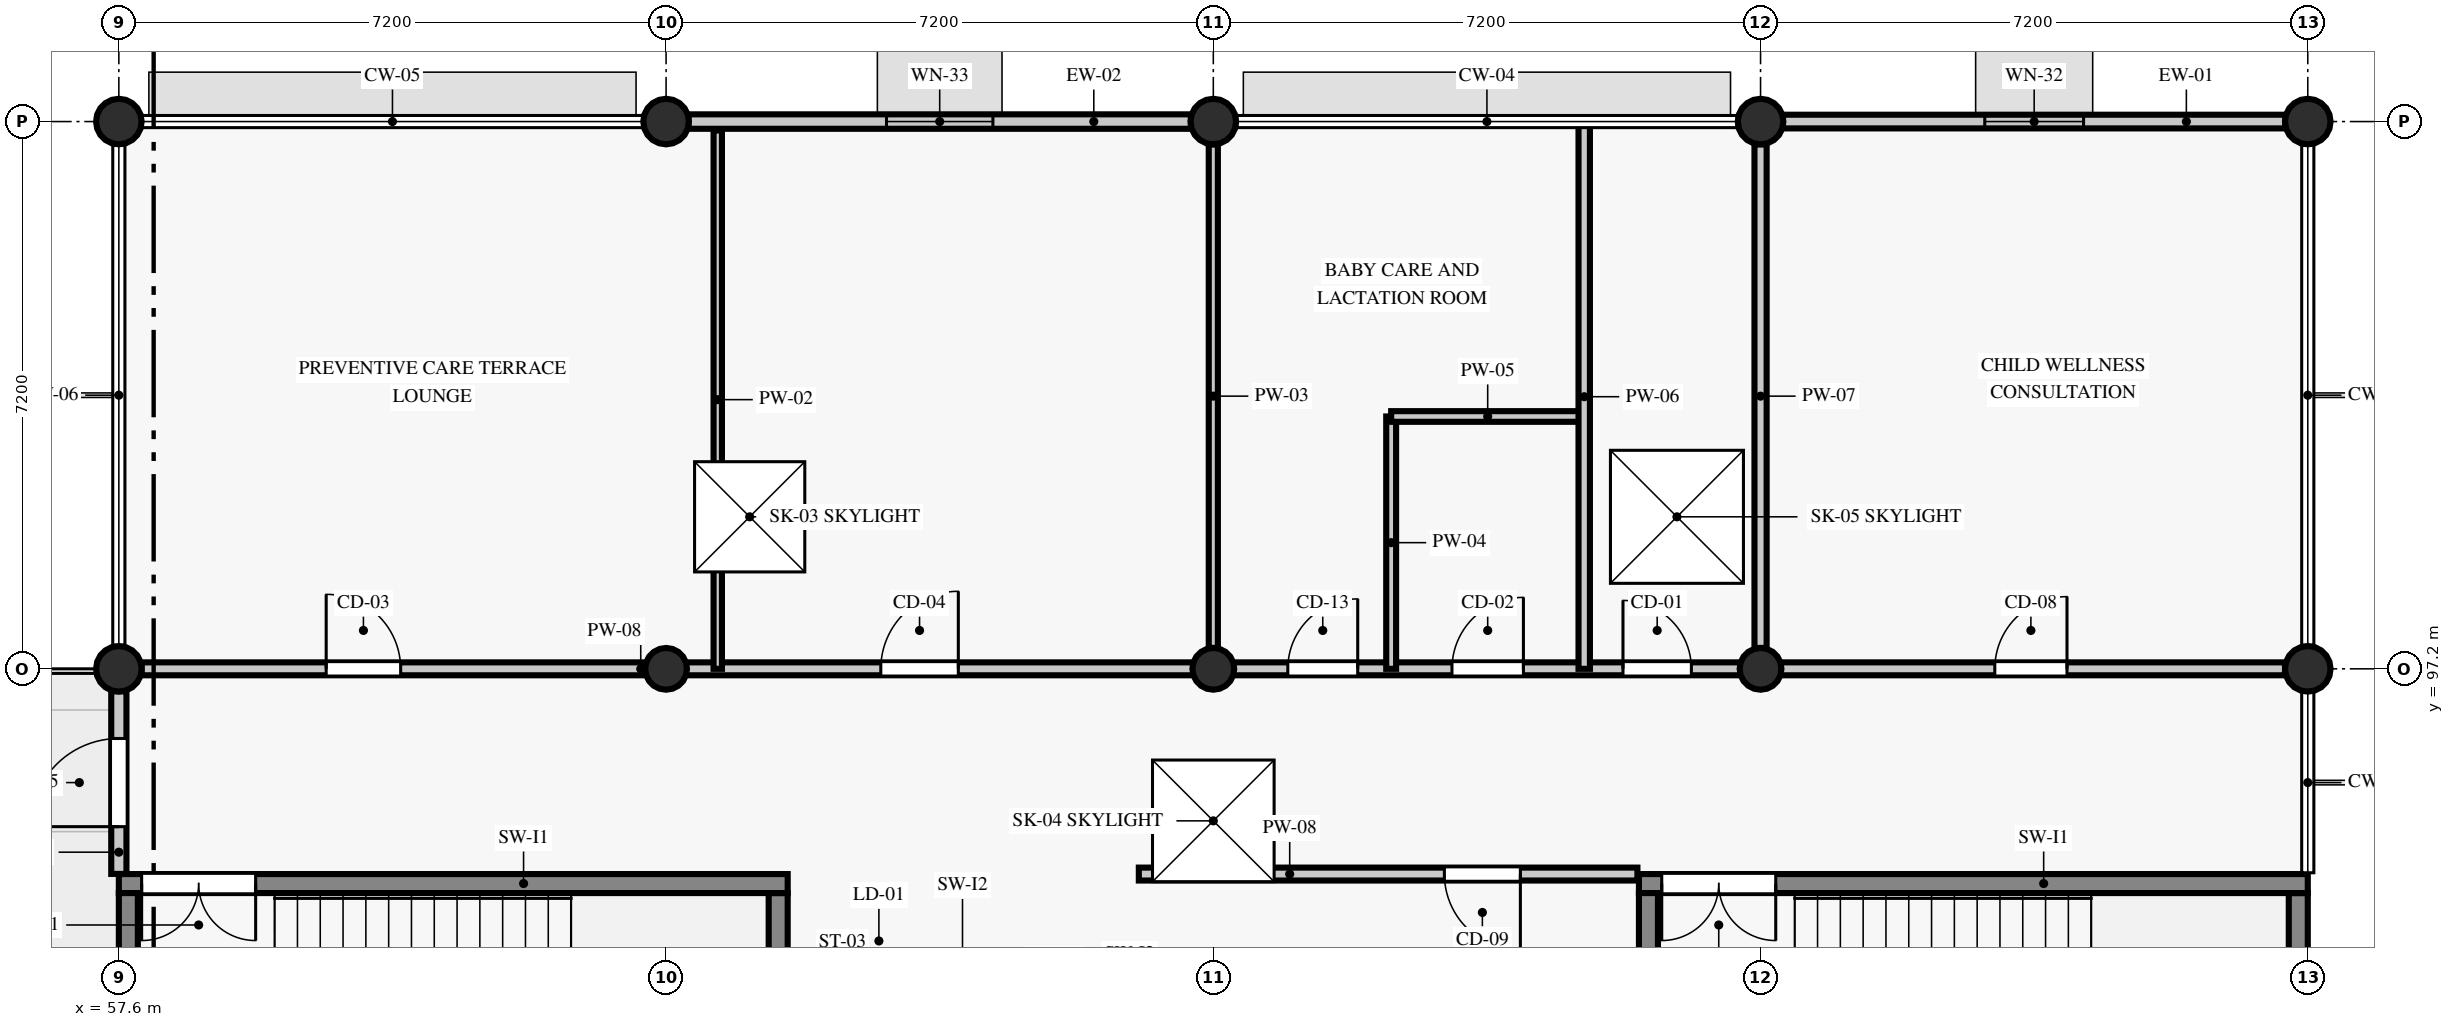
"""IFC4 building model, lengths in metres.
Left out: names, types, materials, properties, quantities, classifications, styles, units other than length and angle.
Written with IfcOpenShell. Run it as: python <this file> out.ifc"""

import sys

from ifc_helpers import new_model, si_unit, direction, frame, frame_2d, origin, origin_2d, place, context, subcontext, project, spatial, rectangle, circle, extrude, element, fill, save


model = new_model("IFC4")
c1 = context("Model", 3, precision=1e-05, world=origin(), true_north=direction((0.0, 1.0)))
c2 = subcontext(c1, "Body", "Model", "MODEL_VIEW")
j1 = project(units=[si_unit("LENGTHUNIT", "METRE"), si_unit("PLANEANGLEUNIT", "RADIAN")], contexts=[c1])
p1 = place(None, origin())
s1 = spatial("IfcSite", under=j1, at=p1, CompositionType="ELEMENT")
p2 = place(p1, origin())
s2 = spatial("IfcBuilding", under=s1, at=p2, CompositionType="ELEMENT")
p3 = place(p2, frame((0.0, 0.0, 22.2)))
s3 = spatial("IfcBuildingStorey", under=s2, at=p3, CompositionType="ELEMENT", Elevation=22.2)
for number, where, z_axis, x_axis in (
    (1, (57.6, 97.2, 0.0), (0.0, 0.0, 1.0), (1.0, 0.0, 0.0)),
    (2, (57.6, 104.4, 0.0), (0.0, 0.0, 1.0), (1.0, 0.0, 0.0)),
):
    element("IfcColumn", number, at=place(p3, frame(where, z_axis=z_axis, x_axis=x_axis)), inside=s3, PredefinedType="COLUMN", context=c2, shape_type="SweptSolid", body=[
        extrude(circle(Radius=0.3, at=origin_2d()), origin(), (0.0, 0.0, 1.0), 3.975),
    ])
p4 = place(p3, frame((64.8, 97.2, 0.0), z_axis=(0.0, 0.0, 1.0), x_axis=(1.0, 0.0, 0.0)))
e3 = element("IfcColumn", 3, at=p4, inside=s3, PredefinedType="COLUMN", context=c2, shape_type="SweptSolid", body=[
    extrude(circle(Radius=0.275, at=origin_2d()), origin(), (0.0, 0.0, 1.0), 3.975),
])
p5 = place(p3, frame((64.8, 104.4, 0.0), z_axis=(0.0, 0.0, 1.0), x_axis=(1.0, 0.0, 0.0)))
e4 = element("IfcColumn", 4, at=p5, inside=s3, PredefinedType="COLUMN", context=c2, shape_type="SweptSolid", body=[
    extrude(circle(Radius=0.3, at=origin_2d()), origin(), (0.0, 0.0, 1.0), 3.975),
])
p6 = place(p3, frame((72.0, 97.2, 0.0), z_axis=(0.0, 0.0, 1.0), x_axis=(1.0, 0.0, 0.0)))
e5 = element("IfcColumn", 5, at=p6, inside=s3, PredefinedType="COLUMN", context=c2, shape_type="SweptSolid", body=[
    extrude(circle(Radius=0.275, at=origin_2d()), origin(), (0.0, 0.0, 1.0), 3.975),
])
p7 = place(p3, frame((72.0, 104.4, 0.0), z_axis=(0.0, 0.0, 1.0), x_axis=(1.0, 0.0, 0.0)))
e6 = element("IfcColumn", 6, at=p7, inside=s3, PredefinedType="COLUMN", context=c2, shape_type="SweptSolid", body=[
    extrude(circle(Radius=0.3, at=origin_2d()), origin(), (0.0, 0.0, 1.0), 3.975),
])
p8 = place(p3, frame((79.2, 97.2, 0.0), z_axis=(0.0, 0.0, 1.0), x_axis=(1.0, 0.0, 0.0)))
e7 = element("IfcColumn", 7, at=p8, inside=s3, PredefinedType="COLUMN", context=c2, shape_type="SweptSolid", body=[
    extrude(circle(Radius=0.275, at=origin_2d()), origin(), (0.0, 0.0, 1.0), 3.975),
])
for number, where, z_axis, x_axis in (
    (8, (79.2, 104.4, 0.0), (0.0, 0.0, 1.0), (1.0, 0.0, 0.0)),
    (9, (86.4, 97.2, 0.0), (0.0, 0.0, 1.0), (1.0, 0.0, 0.0)),
    (10, (86.4, 104.4, 0.0), (0.0, 0.0, 1.0), (1.0, 0.0, 0.0)),
):
    element("IfcColumn", number, at=place(p3, frame(where, z_axis=z_axis, x_axis=x_axis)), inside=s3, PredefinedType="COLUMN", context=c2, shape_type="SweptSolid", body=[
        extrude(circle(Radius=0.3, at=origin_2d()), origin(), (0.0, 0.0, 1.0), 3.975),
    ])
p9 = place(p3, frame((86.105, 104.4, 0.0), z_axis=(0.0, 0.0, 1.0), x_axis=(-1.0, 0.0, 0.0)))
e11 = element("IfcWall", 11, at=p9, inside=s3, PredefinedType="STANDARD", context=c2, shape_type="SweptSolid", body=[
    extrude(rectangle(XDim=6.61, YDim=0.18, at=frame_2d((3.305, 0.0))), origin(), (0.0, 0.0, 1.0), 3.325),
])
p10 = place(p9, frame((2.655, 0.0, 0.9)))
e12 = element("IfcOpeningElement", 12, at=p10, cuts=e11, PredefinedType="OPENING", context=c2, shape_type="SweptSolid", body=[
    extrude(rectangle(XDim=1.3, YDim=1.66, at=frame_2d((0.65, 0.83))), frame((0.0, 0.1, 0.0), z_axis=(0.0, -1.0, 0.0), x_axis=(1.0, 0.0, 0.0)), (0.0, 0.0, 1.0), 0.2),
])
p11 = place(p3, frame((71.705, 104.4, 0.0), z_axis=(0.0, 0.0, 1.0), x_axis=(-1.0, 0.0, 0.0)))
e13 = element("IfcWall", 13, at=p11, inside=s3, PredefinedType="STANDARD", context=c2, shape_type="SweptSolid", body=[
    extrude(rectangle(XDim=6.61, YDim=0.19, at=frame_2d((3.305, 0.0))), origin(), (0.0, 0.0, 1.0), 3.325),
])
p12 = place(p11, frame((2.605, 0.0, 0.9)))
e14 = element("IfcOpeningElement", 14, at=p12, cuts=e13, PredefinedType="OPENING", context=c2, shape_type="SweptSolid", body=[
    extrude(rectangle(XDim=1.4, YDim=1.66, at=frame_2d((0.7, 0.83))), frame((0.0, 0.105, 0.0), z_axis=(0.0, -1.0, 0.0), x_axis=(1.0, 0.0, 0.0)), (0.0, 0.0, 1.0), 0.21),
])
p13 = place(p3, frame((57.6, 96.905, 0.0), z_axis=(0.0, 0.0, 1.0), x_axis=(0.0, -1.0, 0.0)))
e15 = element("IfcWall", 15, at=p13, inside=s3, PredefinedType="STANDARD", context=c2, shape_type="SweptSolid", body=[
    extrude(rectangle(XDim=2.403, YDim=0.2, at=frame_2d((1.202, 0.0))), origin(), (0.0, 0.0, 1.0), 3.975),
])
p14 = place(p13, frame((0.622, 0.0, 0.0)))
e16 = element("IfcOpeningElement", 16, at=p14, cuts=e15, PredefinedType="OPENING", context=c2, shape_type="SweptSolid", body=[
    extrude(rectangle(XDim=1.16, YDim=2.14, at=frame_2d((0.58, 1.07))), frame((0.0, 0.11, 0.0), z_axis=(0.0, -1.0, 0.0), x_axis=(1.0, 0.0, 0.0)), (0.0, 0.0, 1.0), 0.22),
])
p15 = place(p3, frame((66.275, 90.25, 0.0), z_axis=(0.0, 0.0, 1.0), x_axis=(0.0, 1.0, 0.0)))
e17 = element("IfcWall", 17, at=p15, inside=s3, PredefinedType="SHEAR", context=c2, shape_type="SweptSolid", body=[
    extrude(rectangle(XDim=4.0, YDim=0.25, at=frame_2d((2.0, 0.0))), origin(), (0.0, 0.0, 1.0), 3.975),
])
p16 = place(p3, frame((66.4, 94.375, 0.0), z_axis=(0.0, 0.0, 1.0), x_axis=(-1.0, 0.0, 0.0)))
e18 = element("IfcWall", 18, at=p16, inside=s3, PredefinedType="SHEAR", context=c2, shape_type="SweptSolid", body=[
    extrude(rectangle(XDim=8.8, YDim=0.25, at=frame_2d((4.4, 0.0))), origin(), (0.0, 0.0, 1.0), 3.975),
])
p17 = place(p16, frame((7.0, 0.0, 0.0)))
e19 = element("IfcOpeningElement", 19, at=p17, cuts=e18, PredefinedType="OPENING", context=c2, shape_type="SweptSolid", body=[
    extrude(rectangle(XDim=1.5, YDim=2.15, at=frame_2d((0.75, 1.075))), frame((0.0, 0.135, 0.0), z_axis=(0.0, -1.0, 0.0), x_axis=(1.0, 0.0, 0.0)), (0.0, 0.0, 1.0), 0.27),
])
for number, where, z_axis, x_axis in (
    (20, (57.725, 94.25, 0.0), (0.0, 0.0, 1.0), (0.0, -1.0, 0.0)),
    (21, (86.275, 90.25, 0.0), (0.0, 0.0, 1.0), (0.0, 1.0, 0.0)),
):
    element("IfcWall", number, at=place(p3, frame(where, z_axis=z_axis, x_axis=x_axis)), inside=s3, PredefinedType="SHEAR", context=c2, shape_type="SweptSolid", body=[
        extrude(rectangle(XDim=4.0, YDim=0.25, at=frame_2d((2.0, 0.0))), origin(), (0.0, 0.0, 1.0), 3.975),
    ])
p18 = place(p3, frame((86.4, 94.375, 0.0), z_axis=(0.0, 0.0, 1.0), x_axis=(-1.0, 0.0, 0.0)))
e22 = element("IfcWall", 22, at=p18, inside=s3, PredefinedType="SHEAR", context=c2, shape_type="SweptSolid", body=[
    extrude(rectangle(XDim=8.8, YDim=0.25, at=frame_2d((4.4, 0.0))), origin(), (0.0, 0.0, 1.0), 3.975),
])
p19 = place(p18, frame((7.0, 0.0, 0.0)))
e23 = element("IfcOpeningElement", 23, at=p19, cuts=e22, PredefinedType="OPENING", context=c2, shape_type="SweptSolid", body=[
    extrude(rectangle(XDim=1.5, YDim=2.15, at=frame_2d((0.75, 1.075))), frame((0.0, 0.135, 0.0), z_axis=(0.0, -1.0, 0.0), x_axis=(1.0, 0.0, 0.0)), (0.0, 0.0, 1.0), 0.27),
])
p20 = place(p3, frame((77.725, 94.25, 0.0), z_axis=(0.0, 0.0, 1.0), x_axis=(0.0, -1.0, 0.0)))
e24 = element("IfcWall", 24, at=p20, inside=s3, PredefinedType="SHEAR", context=c2, shape_type="SweptSolid", body=[
    extrude(rectangle(XDim=4.0, YDim=0.25, at=frame_2d((2.0, 0.0))), origin(), (0.0, 0.0, 1.0), 3.975),
])
p21 = place(p3, frame((57.9, 97.2, 0.0), z_axis=(0.0, 0.0, 1.0), x_axis=(1.0, 0.0, 0.0)))
e25 = element("IfcWall", 25, at=p21, inside=s3, PredefinedType="PARTITIONING", context=c2, shape_type="SweptSolid", body=[
    extrude(rectangle(XDim=28.2, YDim=0.17, at=frame_2d((14.1, 0.0))), origin(), (0.0, 0.0, 1.0), 3.225),
])
p22 = place(p21, frame((2.428, 0.0, 0.0)))
e26 = element("IfcOpeningElement", 26, at=p22, cuts=e25, PredefinedType="OPENING", context=c2, shape_type="SweptSolid", body=[
    extrude(rectangle(XDim=0.98, YDim=2.08, at=frame_2d((0.49, 1.04))), frame((0.0, 0.095, 0.0), z_axis=(0.0, -1.0, 0.0), x_axis=(1.0, 0.0, 0.0)), (0.0, 0.0, 1.0), 0.19),
])
p23 = place(p21, frame((9.725, 0.0, 0.0)))
e27 = element("IfcOpeningElement", 27, at=p23, cuts=e25, PredefinedType="OPENING", context=c2, shape_type="SweptSolid", body=[
    extrude(rectangle(XDim=1.02, YDim=2.08, at=frame_2d((0.51, 1.04))), frame((0.0, 0.095, 0.0), z_axis=(0.0, -1.0, 0.0), x_axis=(1.0, 0.0, 0.0)), (0.0, 0.0, 1.0), 0.19),
])
p24 = place(p21, frame((15.08, 0.0, 0.0)))
e28 = element("IfcOpeningElement", 28, at=p24, cuts=e25, PredefinedType="OPENING", context=c2, shape_type="SweptSolid", body=[
    extrude(rectangle(XDim=0.92, YDim=2.18, at=frame_2d((0.46, 1.09))), frame((0.0, 0.095, 0.0), z_axis=(0.0, -1.0, 0.0), x_axis=(1.0, 0.0, 0.0)), (0.0, 0.0, 1.0), 0.19),
])
p25 = place(p21, frame((17.24, 0.0, 0.0)))
e29 = element("IfcOpeningElement", 29, at=p25, cuts=e25, PredefinedType="OPENING", context=c2, shape_type="SweptSolid", body=[
    extrude(rectangle(XDim=0.94, YDim=2.08, at=frame_2d((0.47, 1.04))), frame((0.0, 0.095, 0.0), z_axis=(0.0, -1.0, 0.0), x_axis=(1.0, 0.0, 0.0)), (0.0, 0.0, 1.0), 0.19),
])
p26 = place(p21, frame((19.49, 0.0, 0.0)))
e30 = element("IfcOpeningElement", 30, at=p26, cuts=e25, PredefinedType="OPENING", context=c2, shape_type="SweptSolid", body=[
    extrude(rectangle(XDim=0.9, YDim=2.08, at=frame_2d((0.45, 1.04))), frame((0.0, 0.095, 0.0), z_axis=(0.0, -1.0, 0.0), x_axis=(1.0, 0.0, 0.0)), (0.0, 0.0, 1.0), 0.19),
])
p27 = place(p21, frame((24.382, 0.0, 0.0)))
e31 = element("IfcOpeningElement", 31, at=p27, cuts=e25, PredefinedType="OPENING", context=c2, shape_type="SweptSolid", body=[
    extrude(rectangle(XDim=0.95, YDim=2.13, at=frame_2d((0.475, 1.065))), frame((0.0, 0.095, 0.0), z_axis=(0.0, -1.0, 0.0), x_axis=(1.0, 0.0, 0.0)), (0.0, 0.0, 1.0), 0.19),
])
p28 = place(p3, frame((65.48, 97.2, 0.0), z_axis=(0.0, 0.0, 1.0), x_axis=(0.0, 1.0, 0.0)))
e32 = element("IfcWall", 32, at=p28, inside=s3, PredefinedType="PARTITIONING", context=c2, shape_type="SweptSolid", body=[
    extrude(rectangle(XDim=7.083, YDim=0.11, at=frame_2d((3.542, 0.0))), origin(), (0.0, 0.0, 1.0), 3.225),
])
p29 = place(p3, frame((72.0, 97.475, 0.0), z_axis=(0.0, 0.0, 1.0), x_axis=(0.0, 1.0, 0.0)))
e33 = element("IfcWall", 33, at=p29, inside=s3, PredefinedType="PARTITIONING", context=c2, shape_type="SweptSolid", body=[
    extrude(rectangle(XDim=6.625, YDim=0.12, at=frame_2d((3.312, 0.0))), origin(), (0.0, 0.0, 1.0), 3.425),
])
p30 = place(p3, frame((74.34, 97.2, 0.0), z_axis=(0.0, 0.0, 1.0), x_axis=(0.0, 1.0, 0.0)))
e34 = element("IfcWall", 34, at=p30, inside=s3, PredefinedType="PARTITIONING", context=c2, shape_type="SweptSolid", body=[
    extrude(rectangle(XDim=3.32, YDim=0.13, at=frame_2d((1.66, 0.0))), origin(), (0.0, 0.0, 1.0), 3.225),
])
p31 = place(p3, frame((74.34, 100.52, 0.0), z_axis=(0.0, 0.0, 1.0), x_axis=(1.0, 0.0, 0.0)))
e35 = element("IfcWall", 35, at=p31, inside=s3, PredefinedType="PARTITIONING", context=c2, shape_type="SweptSolid", body=[
    extrude(rectangle(XDim=2.54, YDim=0.14, at=frame_2d((1.27, 0.0))), origin(), (0.0, 0.0, 1.0), 3.975),
])
p32 = place(p3, frame((76.88, 97.2, 0.0), z_axis=(0.0, 0.0, 1.0), x_axis=(0.0, 1.0, 0.0)))
e36 = element("IfcWall", 36, at=p32, inside=s3, PredefinedType="PARTITIONING", context=c2, shape_type="SweptSolid", body=[
    extrude(rectangle(XDim=7.16, YDim=0.15, at=frame_2d((3.58, 0.0))), origin(), (0.0, 0.0, 1.0), 3.225),
])
p33 = place(p3, frame((79.2, 97.475, 0.0), z_axis=(0.0, 0.0, 1.0), x_axis=(0.0, 1.0, 0.0)))
e37 = element("IfcWall", 37, at=p33, inside=s3, PredefinedType="PARTITIONING", context=c2, shape_type="SweptSolid", body=[
    extrude(rectangle(XDim=6.625, YDim=0.16, at=frame_2d((3.312, 0.0))), origin(), (0.0, 0.0, 1.0), 3.425),
])
p34 = place(p3, frame((71.02, 94.5, 0.0), z_axis=(0.0, 0.0, 1.0), x_axis=(1.0, 0.0, 0.0)))
e38 = element("IfcWall", 38, at=p34, inside=s3, PredefinedType="PARTITIONING", context=c2, shape_type="SweptSolid", body=[
    extrude(rectangle(XDim=6.56, YDim=0.17, at=frame_2d((3.28, 0.0))), origin(), (0.0, 0.0, 1.0), 3.425),
])
p35 = place(p34, frame((4.02, 0.0, 0.0)))
e39 = element("IfcOpeningElement", 39, at=p35, cuts=e38, PredefinedType="OPENING", context=c2, shape_type="SweptSolid", body=[
    extrude(rectangle(XDim=1.0, YDim=2.13, at=frame_2d((0.5, 1.065))), frame((0.0, 0.095, 0.0), z_axis=(0.0, -1.0, 0.0), x_axis=(1.0, 0.0, 0.0)), (0.0, 0.0, 1.0), 0.19),
])
p36 = place(p10, origin())
e40 = element("IfcWindow", 40, at=p36, inside=s3, PartitioningType="SINGLE_PANEL", PredefinedType="WINDOW", context=c2, shape_type="SweptSolid", body=[
    extrude(rectangle(XDim=1.3, YDim=1.66, at=frame_2d((0.65, 0.83))), frame((0.0, 0.03, 0.0), z_axis=(0.0, -1.0, 0.0), x_axis=(1.0, 0.0, 0.0)), (0.0, 0.0, 1.0), 0.06),
])
fill(e12, e40)
p37 = place(p12, origin())
e41 = element("IfcWindow", 41, at=p37, inside=s3, PartitioningType="SINGLE_PANEL", PredefinedType="WINDOW", context=c2, shape_type="SweptSolid", body=[
    extrude(rectangle(XDim=1.4, YDim=1.66, at=frame_2d((0.7, 0.83))), frame((0.0, 0.03, 0.0), z_axis=(0.0, -1.0, 0.0), x_axis=(1.0, 0.0, 0.0)), (0.0, 0.0, 1.0), 0.06),
])
fill(e14, e41)
p38 = place(p14, frame((1.16, 0.0, 0.0), z_axis=(0.0, 0.0, 1.0), x_axis=(-1.0, 0.0, 0.0)))
e42 = element("IfcDoor", 42, at=p38, inside=s3, OperationType="SINGLE_SWING_LEFT", PredefinedType="DOOR", context=c2, shape_type="SweptSolid", body=[
    extrude(rectangle(XDim=1.16, YDim=2.14, at=frame_2d((0.58, 1.07))), frame((0.0, 0.025, 0.0), z_axis=(0.0, -1.0, 0.0), x_axis=(1.0, 0.0, 0.0)), (0.0, 0.0, 1.0), 0.05),
])
fill(e16, e42)
p39 = place(p2, frame((0.0, 0.0, 26.4)))
p40 = place(p39, frame((0.0, 0.0, -0.225)))
p41 = place(p40, frame((65.9, 99.2, 0.0)))
p42 = place(p41, frame((0.0, 0.0, 0.175)))
e43 = element("IfcWindow", 43, at=p42, inside=s3, PartitioningType="SINGLE_PANEL", PredefinedType="SKYLIGHT", context=c2, shape_type="SweptSolid", body=[
    extrude(rectangle(XDim=1.45, YDim=1.45, at=origin_2d()), origin(), (0.0, 0.0, 1.0), 0.05),
])
p43 = place(p40, frame((72.0, 95.2, 0.0)))
p44 = place(p43, frame((0.0, 0.0, 0.175)))
e44 = element("IfcWindow", 44, at=p44, inside=s3, PartitioningType="SINGLE_PANEL", PredefinedType="SKYLIGHT", context=c2, shape_type="SweptSolid", body=[
    extrude(rectangle(XDim=1.6, YDim=1.6, at=origin_2d()), origin(), (0.0, 0.0, 1.0), 0.05),
])
p45 = place(p40, frame((78.1, 99.2, 0.0)))
p46 = place(p45, frame((0.0, 0.0, 0.175)))
e45 = element("IfcWindow", 45, at=p46, inside=s3, PartitioningType="SINGLE_PANEL", PredefinedType="SKYLIGHT", context=c2, shape_type="SweptSolid", body=[
    extrude(rectangle(XDim=1.75, YDim=1.75, at=origin_2d()), origin(), (0.0, 0.0, 1.0), 0.05),
])
p47 = place(p17, origin())
e46 = element("IfcDoor", 46, at=p47, inside=s3, OperationType="DOUBLE_DOOR_SINGLE_SWING", PredefinedType="DOOR", context=c2, shape_type="SweptSolid", body=[
    extrude(rectangle(XDim=1.5, YDim=2.15, at=frame_2d((0.75, 1.075))), frame((0.0, 0.025, 0.0), z_axis=(0.0, -1.0, 0.0), x_axis=(1.0, 0.0, 0.0)), (0.0, 0.0, 1.0), 0.05),
])
fill(e19, e46)
p48 = place(p19, origin())
e47 = element("IfcDoor", 47, at=p48, inside=s3, OperationType="DOUBLE_DOOR_SINGLE_SWING", PredefinedType="DOOR", context=c2, shape_type="SweptSolid", body=[
    extrude(rectangle(XDim=1.5, YDim=2.15, at=frame_2d((0.75, 1.075))), frame((0.0, 0.025, 0.0), z_axis=(0.0, -1.0, 0.0), x_axis=(1.0, 0.0, 0.0)), (0.0, 0.0, 1.0), 0.05),
])
fill(e23, e47)
p49 = place(p22, origin())
e48 = element("IfcDoor", 48, at=p49, inside=s3, OperationType="SINGLE_SWING_LEFT", PredefinedType="DOOR", context=c2, shape_type="SweptSolid", body=[
    extrude(rectangle(XDim=0.98, YDim=2.08, at=frame_2d((0.49, 1.04))), frame((0.0, 0.025, 0.0), z_axis=(0.0, -1.0, 0.0), x_axis=(1.0, 0.0, 0.0)), (0.0, 0.0, 1.0), 0.05),
])
fill(e26, e48)
p50 = place(p23, origin())
e49 = element("IfcDoor", 49, at=p50, inside=s3, OperationType="SINGLE_SWING_RIGHT", PredefinedType="DOOR", context=c2, shape_type="SweptSolid", body=[
    extrude(rectangle(XDim=1.02, YDim=2.08, at=frame_2d((0.51, 1.04))), frame((0.0, 0.025, 0.0), z_axis=(0.0, -1.0, 0.0), x_axis=(1.0, 0.0, 0.0)), (0.0, 0.0, 1.0), 0.05),
])
fill(e27, e49)
p51 = place(p24, origin())
e50 = element("IfcDoor", 50, at=p51, inside=s3, OperationType="SINGLE_SWING_RIGHT", PredefinedType="DOOR", context=c2, shape_type="SweptSolid", body=[
    extrude(rectangle(XDim=0.92, YDim=2.18, at=frame_2d((0.46, 1.09))), frame((0.0, 0.025, 0.0), z_axis=(0.0, -1.0, 0.0), x_axis=(1.0, 0.0, 0.0)), (0.0, 0.0, 1.0), 0.05),
])
fill(e28, e50)
p52 = place(p25, origin())
e51 = element("IfcDoor", 51, at=p52, inside=s3, OperationType="SINGLE_SWING_RIGHT", PredefinedType="DOOR", context=c2, shape_type="SweptSolid", body=[
    extrude(rectangle(XDim=0.94, YDim=2.08, at=frame_2d((0.47, 1.04))), frame((0.0, 0.025, 0.0), z_axis=(0.0, -1.0, 0.0), x_axis=(1.0, 0.0, 0.0)), (0.0, 0.0, 1.0), 0.05),
])
fill(e29, e51)
p53 = place(p26, origin())
e52 = element("IfcDoor", 52, at=p53, inside=s3, OperationType="SINGLE_SWING_LEFT", PredefinedType="DOOR", context=c2, shape_type="SweptSolid", body=[
    extrude(rectangle(XDim=0.9, YDim=2.08, at=frame_2d((0.45, 1.04))), frame((0.0, 0.025, 0.0), z_axis=(0.0, -1.0, 0.0), x_axis=(1.0, 0.0, 0.0)), (0.0, 0.0, 1.0), 0.05),
])
fill(e30, e52)
p54 = place(p27, origin())
e53 = element("IfcDoor", 53, at=p54, inside=s3, OperationType="SINGLE_SWING_RIGHT", PredefinedType="DOOR", context=c2, shape_type="SweptSolid", body=[
    extrude(rectangle(XDim=0.95, YDim=2.13, at=frame_2d((0.475, 1.065))), frame((0.0, 0.025, 0.0), z_axis=(0.0, -1.0, 0.0), x_axis=(1.0, 0.0, 0.0)), (0.0, 0.0, 1.0), 0.05),
])
fill(e31, e53)
p55 = place(p35, frame((1.0, 0.0, 0.0), z_axis=(0.0, 0.0, 1.0), x_axis=(-1.0, 0.0, 0.0)))
e54 = element("IfcDoor", 54, at=p55, inside=s3, OperationType="SINGLE_SWING_LEFT", PredefinedType="DOOR", context=c2, shape_type="SweptSolid", body=[
    extrude(rectangle(XDim=1.0, YDim=2.13, at=frame_2d((0.5, 1.065))), frame((0.0, 0.025, 0.0), z_axis=(0.0, -1.0, 0.0), x_axis=(1.0, 0.0, 0.0)), (0.0, 0.0, 1.0), 0.05),
])
fill(e39, e54)
save(model, sys.argv[1])
